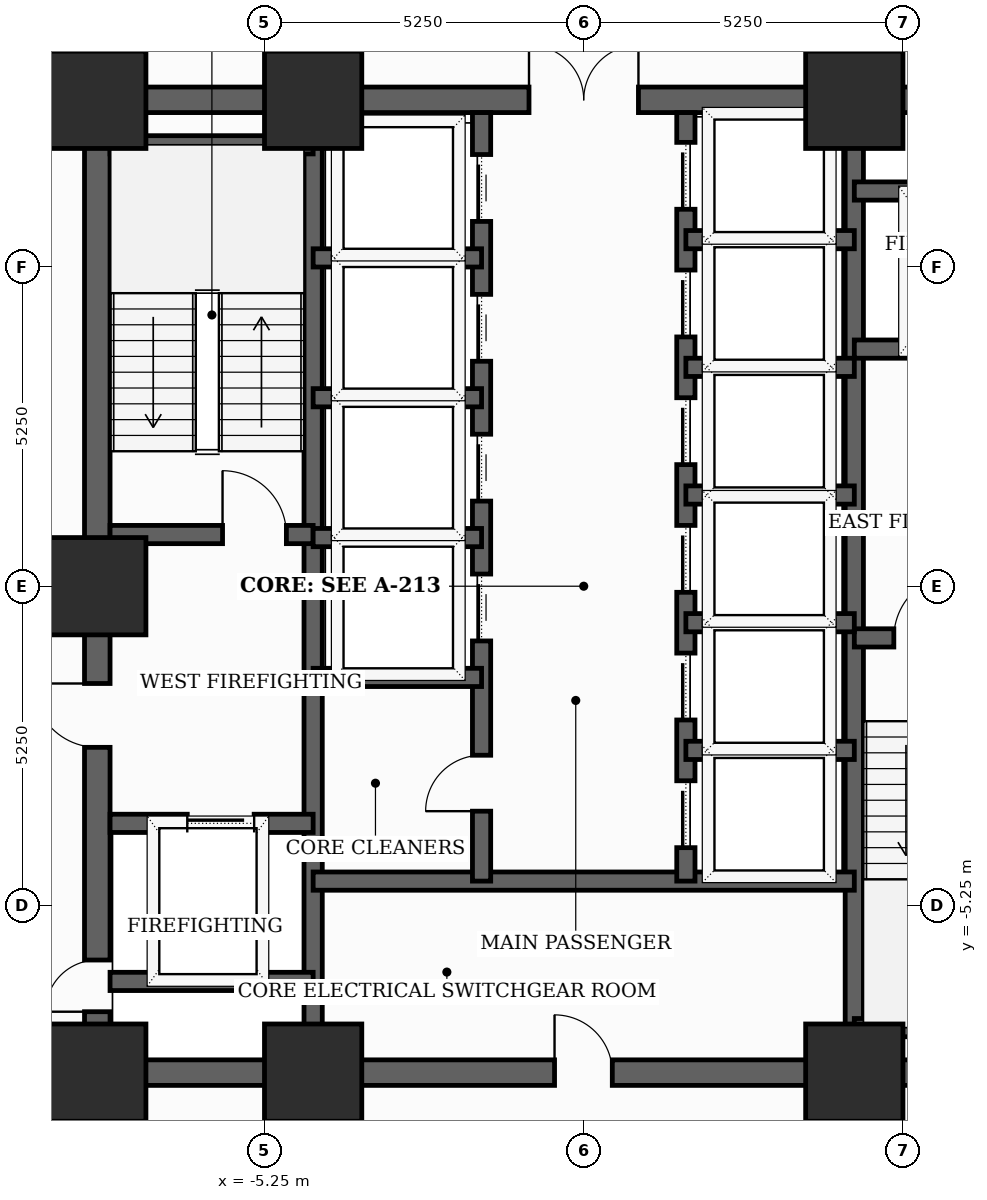
"""IFC4 building model, lengths in metres.
Left out: names, types, materials, properties, quantities, classifications, styles, units other than length and angle.
Written with IfcOpenShell. Run it as: python <this file> out.ifc"""

import sys

from ifc_helpers import new_model, si_unit, direction, frame, frame_2d, origin, origin_2d, place, context, subcontext, project, spatial, rectangle, extrude, element, fill, save


model = new_model("IFC4")
c1 = context("Model", 3, precision=1e-05, world=origin(), true_north=direction((0.0, 1.0)))
c2 = subcontext(c1, "Body", "Model", "MODEL_VIEW")
j1 = project(units=[si_unit("LENGTHUNIT", "METRE"), si_unit("PLANEANGLEUNIT", "RADIAN")], contexts=[c1])
p1 = place(None, origin())
s1 = spatial("IfcSite", under=j1, at=p1, CompositionType="ELEMENT")
p2 = place(p1, origin())
s2 = spatial("IfcBuilding", under=s1, at=p2, CompositionType="ELEMENT")
p3 = place(p2, frame((0.0, 0.0, 29.7)))
s3 = spatial("IfcBuildingStorey", under=s2, at=p3, CompositionType="ELEMENT", Elevation=29.7)
for number, where, z_axis, x_axis in (
    (1, (-8.0, -8.0, 0.0), (0.0, 0.0, 1.0), (1.0, 0.0, 0.0)),
    (2, (-4.45, -8.0, 0.0), (0.0, 0.0, 1.0), (1.0, 0.0, 0.0)),
    (3, (4.45, -8.0, 0.0), (0.0, 0.0, 1.0), (1.0, 0.0, 0.0)),
    (4, (4.45, 8.0, 0.0), (0.0, 0.0, 1.0), (1.0, 0.0, 0.0)),
    (5, (-4.45, 8.0, 0.0), (0.0, 0.0, 1.0), (1.0, 0.0, 0.0)),
    (6, (-8.0, 8.0, 0.0), (0.0, 0.0, 1.0), (1.0, 0.0, 0.0)),
    (7, (-8.0, 0.0, 0.0), (0.0, 0.0, 1.0), (1.0, 0.0, 0.0)),
):
    element("IfcColumn", number, at=place(p3, frame(where, z_axis=z_axis, x_axis=x_axis)), inside=s3, PredefinedType="COLUMN", context=c2, shape_type="SweptSolid", body=[
        extrude(rectangle(XDim=1.6, YDim=1.6, at=origin_2d()), origin(), (0.0, 0.0, 1.0), 3.7),
    ])
p4 = place(p3, frame((-8.0, -8.0, 0.0), z_axis=(0.0, 0.0, 1.0), x_axis=(0.0, 1.0, 0.0)))
e8 = element("IfcWall", 8, at=p4, inside=s3, PredefinedType="SHEAR", context=c2, shape_type="SweptSolid", body=[
    extrude(rectangle(XDim=16.0, YDim=0.42, at=frame_2d((8.0, 0.0))), origin(), (0.0, 0.0, 1.0), 3.5),
])
p5 = place(p4, frame((1.002, 0.0, 0.0)))
e9 = element("IfcOpeningElement", 9, at=p5, cuts=e8, PredefinedType="OPENING", context=c2, shape_type="SweptSolid", body=[
    extrude(rectangle(XDim=0.85, YDim=2.02, at=frame_2d((0.425, 1.01))), frame((0.0, 0.22, 0.0), z_axis=(0.0, -1.0, 0.0), x_axis=(1.0, 0.0, 0.0)), (0.0, 0.0, 1.0), 0.44),
])
p6 = place(p4, frame((5.35, 0.0, 0.0)))
e10 = element("IfcOpeningElement", 10, at=p6, cuts=e8, PredefinedType="OPENING", context=c2, shape_type="SweptSolid", body=[
    extrude(rectangle(XDim=1.05, YDim=2.15, at=frame_2d((0.525, 1.075))), frame((0.0, 0.22, 0.0), z_axis=(0.0, -1.0, 0.0), x_axis=(1.0, 0.0, 0.0)), (0.0, 0.0, 1.0), 0.44),
])
p7 = place(p3, frame((-8.0, -8.0, 0.0), z_axis=(0.0, 0.0, 1.0), x_axis=(1.0, 0.0, 0.0)))
e11 = element("IfcWall", 11, at=p7, inside=s3, PredefinedType="SHEAR", context=c2, shape_type="SweptSolid", body=[
    extrude(rectangle(XDim=16.0, YDim=0.42, at=frame_2d((8.0, 0.0))), origin(), (0.0, 0.0, 1.0), 3.5),
])
p8 = place(p7, frame((7.52, 0.0, 0.0)))
e12 = element("IfcOpeningElement", 12, at=p8, cuts=e11, PredefinedType="OPENING", context=c2, shape_type="SweptSolid", body=[
    extrude(rectangle(XDim=0.95, YDim=2.1, at=frame_2d((0.475, 1.05))), frame((0.0, 0.22, 0.0), z_axis=(0.0, -1.0, 0.0), x_axis=(1.0, 0.0, 0.0)), (0.0, 0.0, 1.0), 0.44),
])
p9 = place(p3, frame((-8.0, 8.0, 0.0), z_axis=(0.0, 0.0, 1.0), x_axis=(1.0, 0.0, 0.0)))
e13 = element("IfcWall", 13, at=p9, inside=s3, PredefinedType="SHEAR", context=c2, shape_type="SweptSolid", body=[
    extrude(rectangle(XDim=16.0, YDim=0.42, at=frame_2d((8.0, 0.0))), origin(), (0.0, 0.0, 1.0), 3.5),
])
p10 = place(p9, frame((7.1, 0.0, 0.0)))
e14 = element("IfcOpeningElement", 14, at=p10, cuts=e13, PredefinedType="OPENING", context=c2, shape_type="SweptSolid", body=[
    extrude(rectangle(XDim=1.8, YDim=2.15, at=frame_2d((0.9, 1.075))), frame((0.0, 0.22, 0.0), z_axis=(0.0, -1.0, 0.0), x_axis=(1.0, 0.0, 0.0)), (0.0, 0.0, 1.0), 0.44),
])
for number, where, z_axis, x_axis in (
    (15, (-4.45, -7.79, 0.0), (0.0, 0.0, 1.0), (0.0, 1.0, 0.0)),
    (16, (4.45, -7.79, 0.0), (0.0, 0.0, 1.0), (0.0, 1.0, 0.0)),
):
    element("IfcWall", number, at=place(p3, frame(where, z_axis=z_axis, x_axis=x_axis)), inside=s3, PredefinedType="SHEAR", context=c2, shape_type="SweptSolid", body=[
        extrude(rectangle(XDim=15.58, YDim=0.3, at=frame_2d((7.79, 0.0))), origin(), (0.0, 0.0, 1.0), 3.5),
    ])
p11 = place(p3, frame((-7.79, 0.85, 0.0), z_axis=(0.0, 0.0, 1.0), x_axis=(1.0, 0.0, 0.0)))
e17 = element("IfcWall", 17, at=p11, inside=s3, PredefinedType="SHEAR", context=c2, shape_type="SweptSolid", body=[
    extrude(rectangle(XDim=3.34, YDim=0.3, at=frame_2d((1.67, 0.0))), origin(), (0.0, 0.0, 1.0), 3.5),
])
p12 = place(p11, frame((1.85, 0.0, 0.0)))
e18 = element("IfcOpeningElement", 18, at=p12, cuts=e17, PredefinedType="OPENING", context=c2, shape_type="SweptSolid", body=[
    extrude(rectangle(XDim=1.05, YDim=2.15, at=frame_2d((0.525, 1.075))), frame((0.0, 0.16, 0.0), z_axis=(0.0, -1.0, 0.0), x_axis=(1.0, 0.0, 0.0)), (0.0, 0.0, 1.0), 0.32),
])
p13 = place(p3, frame((-7.79, 7.26, 0.0), z_axis=(0.0, 0.0, 1.0), x_axis=(1.0, 0.0, 0.0)))
e19 = element("IfcWall", 19, at=p13, inside=s3, PredefinedType="SHEAR", context=c2, shape_type="SweptSolid", body=[
    extrude(rectangle(XDim=3.34, YDim=0.3, at=frame_2d((1.67, 0.0))), origin(), (0.0, 0.0, 1.0), 3.5),
])
p14 = place(p3, frame((4.45, -0.85, 0.0), z_axis=(0.0, 0.0, 1.0), x_axis=(1.0, 0.0, 0.0)))
e20 = element("IfcWall", 20, at=p14, inside=s3, PredefinedType="SHEAR", context=c2, shape_type="SweptSolid", body=[
    extrude(rectangle(XDim=3.34, YDim=0.3, at=frame_2d((1.67, 0.0))), origin(), (0.0, 0.0, 1.0), 3.5),
])
p15 = place(p14, frame((0.65, 0.0, 0.0)))
e21 = element("IfcOpeningElement", 21, at=p15, cuts=e20, PredefinedType="OPENING", context=c2, shape_type="SweptSolid", body=[
    extrude(rectangle(XDim=1.05, YDim=2.15, at=frame_2d((0.525, 1.075))), frame((0.0, 0.16, 0.0), z_axis=(0.0, -1.0, 0.0), x_axis=(1.0, 0.0, 0.0)), (0.0, 0.0, 1.0), 0.32),
])
p16 = place(p3, frame((4.45, -7.26, 0.0), z_axis=(0.0, 0.0, 1.0), x_axis=(1.0, 0.0, 0.0)))
e22 = element("IfcWall", 22, at=p16, inside=s3, PredefinedType="SHEAR", context=c2, shape_type="SweptSolid", body=[
    extrude(rectangle(XDim=3.55, YDim=0.3, at=frame_2d((1.775, 0.0))), origin(), (0.0, 0.0, 1.0), 3.5),
])
p17 = place(p3, frame((-7.79, -3.9, 0.0), z_axis=(0.0, 0.0, 1.0), x_axis=(1.0, 0.0, 0.0)))
e23 = element("IfcWall", 23, at=p17, inside=s3, PredefinedType="SHEAR", context=c2, shape_type="SweptSolid", body=[
    extrude(rectangle(XDim=3.34, YDim=0.3, at=frame_2d((1.67, 0.0))), origin(), (0.0, 0.0, 1.0), 3.5),
])
p18 = place(p17, frame((1.27, 0.0, 0.0)))
e24 = element("IfcOpeningElement", 24, at=p18, cuts=e23, PredefinedType="OPENING", context=c2, shape_type="SweptSolid", body=[
    extrude(rectangle(XDim=1.1, YDim=2.1, at=frame_2d((0.55, 1.05))), frame((0.0, 0.16, 0.0), z_axis=(0.0, -1.0, 0.0), x_axis=(1.0, 0.0, 0.0)), (0.0, 0.0, 1.0), 0.32),
])
p19 = place(p3, frame((-7.79, -6.5, 0.0), z_axis=(0.0, 0.0, 1.0), x_axis=(1.0, 0.0, 0.0)))
e25 = element("IfcWall", 25, at=p19, inside=s3, PredefinedType="SHEAR", context=c2, shape_type="SweptSolid", body=[
    extrude(rectangle(XDim=3.34, YDim=0.3, at=frame_2d((1.67, 0.0))), origin(), (0.0, 0.0, 1.0), 3.5),
])
p20 = place(p3, frame((4.45, 3.9, 0.0), z_axis=(0.0, 0.0, 1.0), x_axis=(1.0, 0.0, 0.0)))
e26 = element("IfcWall", 26, at=p20, inside=s3, PredefinedType="SHEAR", context=c2, shape_type="SweptSolid", body=[
    extrude(rectangle(XDim=3.34, YDim=0.3, at=frame_2d((1.67, 0.0))), origin(), (0.0, 0.0, 1.0), 3.5),
])
p21 = place(p20, frame((1.18, 0.0, 0.0)))
e27 = element("IfcOpeningElement", 27, at=p21, cuts=e26, PredefinedType="OPENING", context=c2, shape_type="SweptSolid", body=[
    extrude(rectangle(XDim=1.1, YDim=2.1, at=frame_2d((0.55, 1.05))), frame((0.0, 0.16, 0.0), z_axis=(0.0, -1.0, 0.0), x_axis=(1.0, 0.0, 0.0)), (0.0, 0.0, 1.0), 0.32),
])
p22 = place(p3, frame((4.45, 6.5, 0.0), z_axis=(0.0, 0.0, 1.0), x_axis=(1.0, 0.0, 0.0)))
e28 = element("IfcWall", 28, at=p22, inside=s3, PredefinedType="SHEAR", context=c2, shape_type="SweptSolid", body=[
    extrude(rectangle(XDim=3.34, YDim=0.3, at=frame_2d((1.67, 0.0))), origin(), (0.0, 0.0, 1.0), 3.5),
])
p23 = place(p3, frame((-4.45, -4.85, 0.0), z_axis=(0.0, 0.0, 1.0), x_axis=(1.0, 0.0, 0.0)))
e29 = element("IfcWall", 29, at=p23, inside=s3, PredefinedType="SHEAR", context=c2, shape_type="SweptSolid", body=[
    extrude(rectangle(XDim=8.9, YDim=0.3, at=frame_2d((4.45, 0.0))), origin(), (0.0, 0.0, 1.0), 3.5),
])
p24 = place(p3, frame((-1.68, -4.85, 0.0), z_axis=(0.0, 0.0, 1.0), x_axis=(0.0, 1.0, 0.0)))
e30 = element("IfcWall", 30, at=p24, inside=s3, PredefinedType="SHEAR", context=c2, shape_type="SweptSolid", body=[
    extrude(rectangle(XDim=12.64, YDim=0.3, at=frame_2d((6.32, 0.0))), origin(), (0.0, 0.0, 1.0), 3.5),
])
p25 = place(p24, frame((3.95, 0.0, 0.0)))
e31 = element("IfcOpeningElement", 31, at=p25, cuts=e30, PredefinedType="OPENING", context=c2, shape_type="SweptSolid", body=[
    extrude(rectangle(XDim=1.1, YDim=2.1, at=frame_2d((0.55, 1.05))), frame((0.0, 0.16, 0.0), z_axis=(0.0, -1.0, 0.0), x_axis=(1.0, 0.0, 0.0)), (0.0, 0.0, 1.0), 0.32),
])
p26 = place(p24, frame((6.25, 0.0, 0.0)))
e32 = element("IfcOpeningElement", 32, at=p26, cuts=e30, PredefinedType="OPENING", context=c2, shape_type="SweptSolid", body=[
    extrude(rectangle(XDim=1.1, YDim=2.1, at=frame_2d((0.55, 1.05))), frame((0.0, 0.16, 0.0), z_axis=(0.0, -1.0, 0.0), x_axis=(1.0, 0.0, 0.0)), (0.0, 0.0, 1.0), 0.32),
])
p27 = place(p24, frame((8.55, 0.0, 0.0)))
e33 = element("IfcOpeningElement", 33, at=p27, cuts=e30, PredefinedType="OPENING", context=c2, shape_type="SweptSolid", body=[
    extrude(rectangle(XDim=1.1, YDim=2.1, at=frame_2d((0.55, 1.05))), frame((0.0, 0.16, 0.0), z_axis=(0.0, -1.0, 0.0), x_axis=(1.0, 0.0, 0.0)), (0.0, 0.0, 1.0), 0.32),
])
p28 = place(p24, frame((10.85, 0.0, 0.0)))
e34 = element("IfcOpeningElement", 34, at=p28, cuts=e30, PredefinedType="OPENING", context=c2, shape_type="SweptSolid", body=[
    extrude(rectangle(XDim=1.1, YDim=2.1, at=frame_2d((0.55, 1.05))), frame((0.0, 0.16, 0.0), z_axis=(0.0, -1.0, 0.0), x_axis=(1.0, 0.0, 0.0)), (0.0, 0.0, 1.0), 0.32),
])
p29 = place(p24, frame((1.15, 0.0, 0.0)))
e35 = element("IfcOpeningElement", 35, at=p29, cuts=e30, PredefinedType="OPENING", context=c2, shape_type="SweptSolid", body=[
    extrude(rectangle(XDim=0.92, YDim=2.1, at=frame_2d((0.46, 1.05))), frame((0.0, 0.16, 0.0), z_axis=(0.0, -1.0, 0.0), x_axis=(1.0, 0.0, 0.0)), (0.0, 0.0, 1.0), 0.32),
])
p30 = place(p3, frame((1.68, -4.85, 0.0), z_axis=(0.0, 0.0, 1.0), x_axis=(0.0, 1.0, 0.0)))
e36 = element("IfcWall", 36, at=p30, inside=s3, PredefinedType="SHEAR", context=c2, shape_type="SweptSolid", body=[
    extrude(rectangle(XDim=12.64, YDim=0.3, at=frame_2d((6.32, 0.0))), origin(), (0.0, 0.0, 1.0), 3.5),
])
p31 = place(p30, frame((0.55, 0.0, 0.0)))
e37 = element("IfcOpeningElement", 37, at=p31, cuts=e36, PredefinedType="OPENING", context=c2, shape_type="SweptSolid", body=[
    extrude(rectangle(XDim=1.1, YDim=2.1, at=frame_2d((0.55, 1.05))), frame((0.0, 0.16, 0.0), z_axis=(0.0, -1.0, 0.0), x_axis=(1.0, 0.0, 0.0)), (0.0, 0.0, 1.0), 0.32),
])
p32 = place(p30, frame((2.65, 0.0, 0.0)))
e38 = element("IfcOpeningElement", 38, at=p32, cuts=e36, PredefinedType="OPENING", context=c2, shape_type="SweptSolid", body=[
    extrude(rectangle(XDim=1.1, YDim=2.1, at=frame_2d((0.55, 1.05))), frame((0.0, 0.16, 0.0), z_axis=(0.0, -1.0, 0.0), x_axis=(1.0, 0.0, 0.0)), (0.0, 0.0, 1.0), 0.32),
])
p33 = place(p30, frame((4.75, 0.0, 0.0)))
e39 = element("IfcOpeningElement", 39, at=p33, cuts=e36, PredefinedType="OPENING", context=c2, shape_type="SweptSolid", body=[
    extrude(rectangle(XDim=1.1, YDim=2.1, at=frame_2d((0.55, 1.05))), frame((0.0, 0.16, 0.0), z_axis=(0.0, -1.0, 0.0), x_axis=(1.0, 0.0, 0.0)), (0.0, 0.0, 1.0), 0.32),
])
p34 = place(p30, frame((6.85, 0.0, 0.0)))
e40 = element("IfcOpeningElement", 40, at=p34, cuts=e36, PredefinedType="OPENING", context=c2, shape_type="SweptSolid", body=[
    extrude(rectangle(XDim=1.1, YDim=2.1, at=frame_2d((0.55, 1.05))), frame((0.0, 0.16, 0.0), z_axis=(0.0, -1.0, 0.0), x_axis=(1.0, 0.0, 0.0)), (0.0, 0.0, 1.0), 0.32),
])
p35 = place(p30, frame((8.95, 0.0, 0.0)))
e41 = element("IfcOpeningElement", 41, at=p35, cuts=e36, PredefinedType="OPENING", context=c2, shape_type="SweptSolid", body=[
    extrude(rectangle(XDim=1.1, YDim=2.1, at=frame_2d((0.55, 1.05))), frame((0.0, 0.16, 0.0), z_axis=(0.0, -1.0, 0.0), x_axis=(1.0, 0.0, 0.0)), (0.0, 0.0, 1.0), 0.32),
])
p36 = place(p30, frame((11.05, 0.0, 0.0)))
e42 = element("IfcOpeningElement", 42, at=p36, cuts=e36, PredefinedType="OPENING", context=c2, shape_type="SweptSolid", body=[
    extrude(rectangle(XDim=1.1, YDim=2.1, at=frame_2d((0.55, 1.05))), frame((0.0, 0.16, 0.0), z_axis=(0.0, -1.0, 0.0), x_axis=(1.0, 0.0, 0.0)), (0.0, 0.0, 1.0), 0.32),
])
for number, where, z_axis, x_axis in (
    (43, (-4.45, -1.5, 0.0), (0.0, 0.0, 1.0), (1.0, 0.0, 0.0)),
    (44, (-4.45, 0.8, 0.0), (0.0, 0.0, 1.0), (1.0, 0.0, 0.0)),
    (45, (-4.45, 3.1, 0.0), (0.0, 0.0, 1.0), (1.0, 0.0, 0.0)),
    (46, (-4.45, 5.4, 0.0), (0.0, 0.0, 1.0), (1.0, 0.0, 0.0)),
    (47, (1.68, 1.5, 0.0), (0.0, 0.0, 1.0), (1.0, 0.0, 0.0)),
    (48, (1.68, 3.6, 0.0), (0.0, 0.0, 1.0), (1.0, 0.0, 0.0)),
    (49, (1.68, 5.7, 0.0), (0.0, 0.0, 1.0), (1.0, 0.0, 0.0)),
    (50, (1.68, -2.7, 0.0), (0.0, 0.0, 1.0), (1.0, 0.0, 0.0)),
    (51, (1.68, -0.6, 0.0), (0.0, 0.0, 1.0), (1.0, 0.0, 0.0)),
):
    element("IfcWall", number, at=place(p3, frame(where, z_axis=z_axis, x_axis=x_axis)), inside=s3, PredefinedType="SHEAR", context=c2, shape_type="SweptSolid", body=[
        extrude(rectangle(XDim=2.77, YDim=0.3, at=frame_2d((1.385, 0.0))), origin(), (0.0, 0.0, 1.0), 3.5),
    ])
p37 = place(p5, origin())
e52 = element("IfcDoor", 52, at=p37, inside=s3, OperationType="SINGLE_SWING_LEFT", PredefinedType="TRAPDOOR", context=c2, shape_type="SweptSolid", body=[
    extrude(rectangle(XDim=0.85, YDim=2.02, at=frame_2d((0.425, 1.01))), frame((0.0, 0.025, 0.0), z_axis=(0.0, -1.0, 0.0), x_axis=(1.0, 0.0, 0.0)), (0.0, 0.0, 1.0), 0.05),
])
fill(e9, e52)
p38 = place(p6, origin())
e53 = element("IfcDoor", 53, at=p38, inside=s3, OperationType="SINGLE_SWING_RIGHT", PredefinedType="DOOR", context=c2, shape_type="SweptSolid", body=[
    extrude(rectangle(XDim=1.05, YDim=2.15, at=frame_2d((0.525, 1.075))), frame((0.0, 0.025, 0.0), z_axis=(0.0, -1.0, 0.0), x_axis=(1.0, 0.0, 0.0)), (0.0, 0.0, 1.0), 0.05),
])
fill(e10, e53)
p39 = place(p8, origin())
e54 = element("IfcDoor", 54, at=p39, inside=s3, OperationType="SINGLE_SWING_LEFT", PredefinedType="DOOR", context=c2, shape_type="SweptSolid", body=[
    extrude(rectangle(XDim=0.95, YDim=2.1, at=frame_2d((0.475, 1.05))), frame((0.0, 0.025, 0.0), z_axis=(0.0, -1.0, 0.0), x_axis=(1.0, 0.0, 0.0)), (0.0, 0.0, 1.0), 0.05),
])
fill(e12, e54)
p40 = place(p10, origin())
e55 = element("IfcDoor", 55, at=p40, inside=s3, OperationType="DOUBLE_DOOR_SINGLE_SWING", PredefinedType="DOOR", context=c2, shape_type="SweptSolid", body=[
    extrude(rectangle(XDim=1.8, YDim=2.15, at=frame_2d((0.9, 1.075))), frame((0.0, 0.025, 0.0), z_axis=(0.0, -1.0, 0.0), x_axis=(1.0, 0.0, 0.0)), (0.0, 0.0, 1.0), 0.05),
])
fill(e14, e55)
p41 = place(p12, origin())
e56 = element("IfcDoor", 56, at=p41, inside=s3, OperationType="SINGLE_SWING_LEFT", PredefinedType="DOOR", context=c2, shape_type="SweptSolid", body=[
    extrude(rectangle(XDim=1.05, YDim=2.15, at=frame_2d((0.525, 1.075))), frame((0.0, 0.025, 0.0), z_axis=(0.0, -1.0, 0.0), x_axis=(1.0, 0.0, 0.0)), (0.0, 0.0, 1.0), 0.05),
])
fill(e18, e56)
p42 = place(p15, origin())
e57 = element("IfcDoor", 57, at=p42, inside=s3, OperationType="SINGLE_SWING_RIGHT", PredefinedType="DOOR", context=c2, shape_type="SweptSolid", body=[
    extrude(rectangle(XDim=1.05, YDim=2.15, at=frame_2d((0.525, 1.075))), frame((0.0, 0.025, 0.0), z_axis=(0.0, -1.0, 0.0), x_axis=(1.0, 0.0, 0.0)), (0.0, 0.0, 1.0), 0.05),
])
fill(e21, e57)
p43 = place(p18, origin())
e58 = element("IfcDoor", 58, at=p43, inside=s3, OperationType="SLIDING_TO_LEFT", PredefinedType="DOOR", context=c2, shape_type="SweptSolid", body=[
    extrude(rectangle(XDim=1.1, YDim=2.1, at=frame_2d((0.55, 1.05))), frame((0.0, 0.025, 0.0), z_axis=(0.0, -1.0, 0.0), x_axis=(1.0, 0.0, 0.0)), (0.0, 0.0, 1.0), 0.05),
])
fill(e24, e58)
p44 = place(p25, origin())
e59 = element("IfcDoor", 59, at=p44, inside=s3, OperationType="SLIDING_TO_LEFT", PredefinedType="DOOR", context=c2, shape_type="SweptSolid", body=[
    extrude(rectangle(XDim=1.1, YDim=2.1, at=frame_2d((0.55, 1.05))), frame((0.0, 0.025, 0.0), z_axis=(0.0, -1.0, 0.0), x_axis=(1.0, 0.0, 0.0)), (0.0, 0.0, 1.0), 0.05),
])
fill(e31, e59)
p45 = place(p26, origin())
e60 = element("IfcDoor", 60, at=p45, inside=s3, OperationType="SLIDING_TO_LEFT", PredefinedType="DOOR", context=c2, shape_type="SweptSolid", body=[
    extrude(rectangle(XDim=1.1, YDim=2.1, at=frame_2d((0.55, 1.05))), frame((0.0, 0.025, 0.0), z_axis=(0.0, -1.0, 0.0), x_axis=(1.0, 0.0, 0.0)), (0.0, 0.0, 1.0), 0.05),
])
fill(e32, e60)
p46 = place(p27, origin())
e61 = element("IfcDoor", 61, at=p46, inside=s3, OperationType="SLIDING_TO_LEFT", PredefinedType="DOOR", context=c2, shape_type="SweptSolid", body=[
    extrude(rectangle(XDim=1.1, YDim=2.1, at=frame_2d((0.55, 1.05))), frame((0.0, 0.025, 0.0), z_axis=(0.0, -1.0, 0.0), x_axis=(1.0, 0.0, 0.0)), (0.0, 0.0, 1.0), 0.05),
])
fill(e33, e61)
p47 = place(p28, origin())
e62 = element("IfcDoor", 62, at=p47, inside=s3, OperationType="SLIDING_TO_LEFT", PredefinedType="DOOR", context=c2, shape_type="SweptSolid", body=[
    extrude(rectangle(XDim=1.1, YDim=2.1, at=frame_2d((0.55, 1.05))), frame((0.0, 0.025, 0.0), z_axis=(0.0, -1.0, 0.0), x_axis=(1.0, 0.0, 0.0)), (0.0, 0.0, 1.0), 0.05),
])
fill(e34, e62)
p48 = place(p29, origin())
e63 = element("IfcDoor", 63, at=p48, inside=s3, OperationType="SINGLE_SWING_LEFT", PredefinedType="DOOR", context=c2, shape_type="SweptSolid", body=[
    extrude(rectangle(XDim=0.92, YDim=2.1, at=frame_2d((0.46, 1.05))), frame((0.0, 0.025, 0.0), z_axis=(0.0, -1.0, 0.0), x_axis=(1.0, 0.0, 0.0)), (0.0, 0.0, 1.0), 0.05),
])
fill(e35, e63)
p49 = place(p31, origin())
e64 = element("IfcDoor", 64, at=p49, inside=s3, OperationType="SLIDING_TO_LEFT", PredefinedType="DOOR", context=c2, shape_type="SweptSolid", body=[
    extrude(rectangle(XDim=1.1, YDim=2.1, at=frame_2d((0.55, 1.05))), frame((0.0, 0.025, 0.0), z_axis=(0.0, -1.0, 0.0), x_axis=(1.0, 0.0, 0.0)), (0.0, 0.0, 1.0), 0.05),
])
fill(e37, e64)
p50 = place(p32, origin())
e65 = element("IfcDoor", 65, at=p50, inside=s3, OperationType="SLIDING_TO_LEFT", PredefinedType="DOOR", context=c2, shape_type="SweptSolid", body=[
    extrude(rectangle(XDim=1.1, YDim=2.1, at=frame_2d((0.55, 1.05))), frame((0.0, 0.025, 0.0), z_axis=(0.0, -1.0, 0.0), x_axis=(1.0, 0.0, 0.0)), (0.0, 0.0, 1.0), 0.05),
])
fill(e38, e65)
p51 = place(p33, origin())
e66 = element("IfcDoor", 66, at=p51, inside=s3, OperationType="SLIDING_TO_LEFT", PredefinedType="DOOR", context=c2, shape_type="SweptSolid", body=[
    extrude(rectangle(XDim=1.1, YDim=2.1, at=frame_2d((0.55, 1.05))), frame((0.0, 0.025, 0.0), z_axis=(0.0, -1.0, 0.0), x_axis=(1.0, 0.0, 0.0)), (0.0, 0.0, 1.0), 0.05),
])
fill(e39, e66)
p52 = place(p34, origin())
e67 = element("IfcDoor", 67, at=p52, inside=s3, OperationType="SLIDING_TO_LEFT", PredefinedType="DOOR", context=c2, shape_type="SweptSolid", body=[
    extrude(rectangle(XDim=1.1, YDim=2.1, at=frame_2d((0.55, 1.05))), frame((0.0, 0.025, 0.0), z_axis=(0.0, -1.0, 0.0), x_axis=(1.0, 0.0, 0.0)), (0.0, 0.0, 1.0), 0.05),
])
fill(e40, e67)
p53 = place(p35, origin())
e68 = element("IfcDoor", 68, at=p53, inside=s3, OperationType="SLIDING_TO_LEFT", PredefinedType="DOOR", context=c2, shape_type="SweptSolid", body=[
    extrude(rectangle(XDim=1.1, YDim=2.1, at=frame_2d((0.55, 1.05))), frame((0.0, 0.025, 0.0), z_axis=(0.0, -1.0, 0.0), x_axis=(1.0, 0.0, 0.0)), (0.0, 0.0, 1.0), 0.05),
])
fill(e41, e68)
p54 = place(p36, origin())
e69 = element("IfcDoor", 69, at=p54, inside=s3, OperationType="SLIDING_TO_LEFT", PredefinedType="DOOR", context=c2, shape_type="SweptSolid", body=[
    extrude(rectangle(XDim=1.1, YDim=2.1, at=frame_2d((0.55, 1.05))), frame((0.0, 0.025, 0.0), z_axis=(0.0, -1.0, 0.0), x_axis=(1.0, 0.0, 0.0)), (0.0, 0.0, 1.0), 0.05),
])
fill(e42, e69)
save(model, sys.argv[1])
